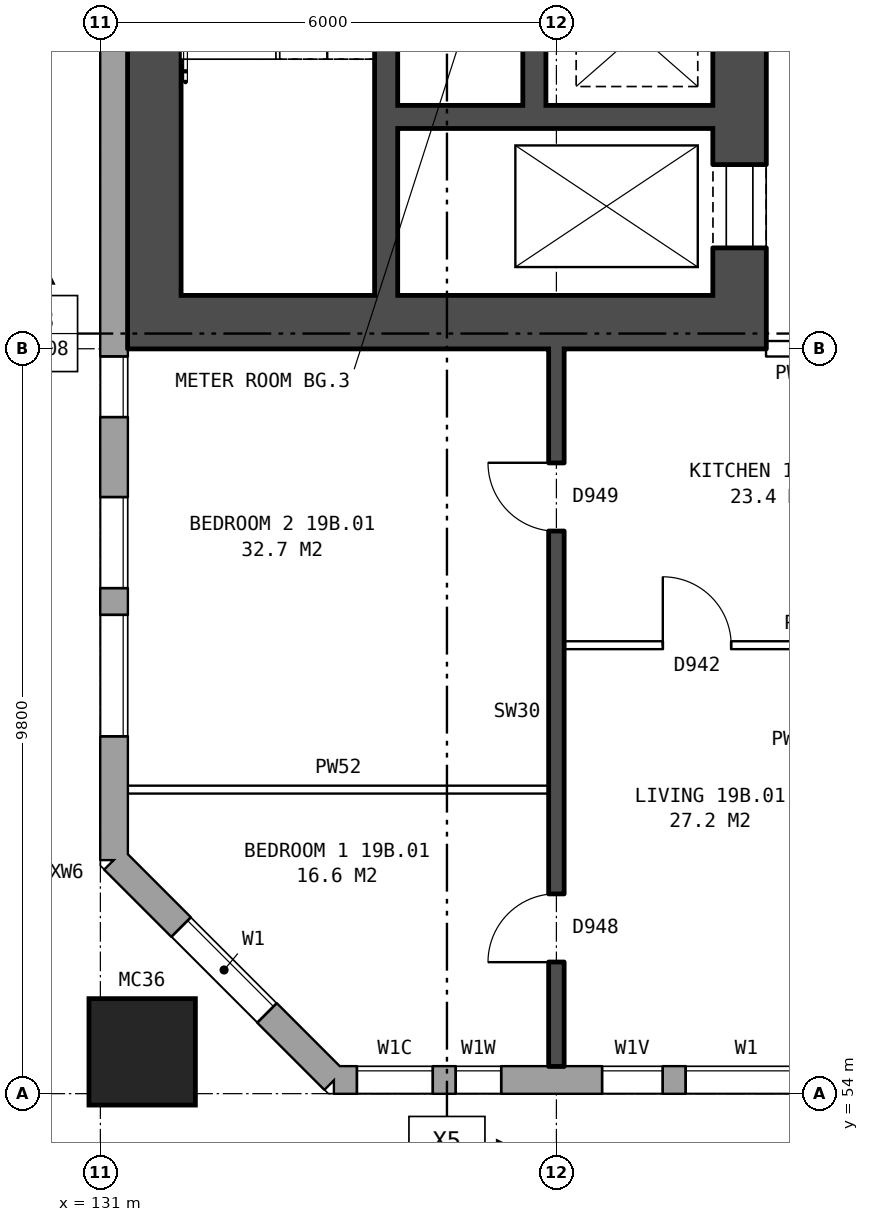
"""IFC4 building model, lengths in metres.
Left out: names, types, materials, properties, quantities, classifications, styles, units other than length and angle.
Written with IfcOpenShell. Run it as: python <this file> out.ifc"""

import sys

from ifc_helpers import new_model, si_unit, direction, frame, frame_2d, origin, origin_2d, place, context, subcontext, project, spatial, rectangle, hollow_rectangle, extrude, element, fill, save


model = new_model("IFC4")
c1 = context("Model", 3, precision=1e-05, world=origin(), true_north=direction((0.0, 1.0)))
c2 = subcontext(c1, "Body", "Model", "MODEL_VIEW")
j1 = project(units=[si_unit("LENGTHUNIT", "METRE"), si_unit("PLANEANGLEUNIT", "RADIAN")], contexts=[c1])
p1 = place(None, origin())
s1 = spatial("IfcSite", under=j1, at=p1, CompositionType="ELEMENT")
p2 = place(p1, origin())
s2 = spatial("IfcBuilding", under=s1, at=p2, CompositionType="ELEMENT")
p3 = place(p2, frame((0.0, 0.0, 71.6)))
s3 = spatial("IfcBuildingStorey", under=s2, at=p3, CompositionType="ELEMENT", Elevation=71.6)
p4 = place(p3, frame((131.55, 54.55, 0.0), z_axis=(0.0, 0.0, 1.0), x_axis=(1.0, 0.0, 0.0)))
e1 = element("IfcColumn", 1, at=p4, inside=s3, PredefinedType="COLUMN", context=c2, shape_type="SweptSolid", body=[
    extrude(hollow_rectangle(XDim=1.4, YDim=1.4, WallThickness=0.075, at=origin_2d()), origin(), (0.0, 0.0, 1.0), 3.1),
])
p5 = place(p3, frame((131.18, 57.075, 0.0), z_axis=(0.0, 0.0, 1.0), x_axis=(0.707106781187, -0.707106781187, 0.0)))
e2 = element("IfcWall", 2, at=p5, inside=s3, PredefinedType="STANDARD", context=c2, shape_type="SweptSolid", body=[
    extrude(rectangle(XDim=4.094, YDim=0.36, at=frame_2d((2.047, 0.0))), origin(), (0.0, 0.0, 1.0), 2.85),
])
p6 = place(p5, frame((1.247, 0.0, 0.8)))
e3 = element("IfcOpeningElement", 3, at=p6, cuts=e2, PredefinedType="OPENING", context=c2, shape_type="SweptSolid", body=[
    extrude(rectangle(XDim=1.6, YDim=1.8, at=frame_2d((0.8, 0.9))), frame((0.0, 0.19, 0.0), z_axis=(0.0, -1.0, 0.0), x_axis=(1.0, 0.0, 0.0)), (0.0, 0.0, 1.0), 0.38),
])
p7 = place(p3, frame((134.075, 54.18, 0.0), z_axis=(0.0, 0.0, 1.0), x_axis=(1.0, 0.0, 0.0)))
e4 = element("IfcWall", 4, at=p7, inside=s3, PredefinedType="STANDARD", context=c2, shape_type="SweptSolid", body=[
    extrude(rectangle(XDim=38.101, YDim=0.36, at=frame_2d((19.05, 0.0))), origin(), (0.0, 0.0, 1.0), 2.85),
])
p8 = place(p7, frame((0.3, 0.0, 0.8)))
e5 = element("IfcOpeningElement", 5, at=p8, cuts=e4, PredefinedType="OPENING", context=c2, shape_type="SweptSolid", body=[
    extrude(rectangle(XDim=1.0, YDim=1.8, at=frame_2d((0.5, 0.9))), frame((0.0, 0.19, 0.0), z_axis=(0.0, -1.0, 0.0), x_axis=(1.0, 0.0, 0.0)), (0.0, 0.0, 1.0), 0.38),
])
p9 = place(p7, frame((3.525, 0.0, 0.8)))
e6 = element("IfcOpeningElement", 6, at=p9, cuts=e4, PredefinedType="OPENING", context=c2, shape_type="SweptSolid", body=[
    extrude(rectangle(XDim=0.8, YDim=0.9, at=frame_2d((0.4, 0.45))), frame((0.0, 0.19, 0.0), z_axis=(0.0, -1.0, 0.0), x_axis=(1.0, 0.0, 0.0)), (0.0, 0.0, 1.0), 0.38),
])
p10 = place(p7, frame((6.625, 0.0, 0.8)))
e7 = element("IfcOpeningElement", 7, at=p10, cuts=e4, PredefinedType="OPENING", context=c2, shape_type="SweptSolid", body=[
    extrude(rectangle(XDim=1.6, YDim=1.8, at=frame_2d((0.8, 0.9))), frame((0.0, 0.19, 0.0), z_axis=(0.0, -1.0, 0.0), x_axis=(1.0, 0.0, 0.0)), (0.0, 0.0, 1.0), 0.38),
])
p11 = place(p7, frame((9.625, 0.0, 0.8)))
e8 = element("IfcOpeningElement", 8, at=p11, cuts=e4, PredefinedType="OPENING", context=c2, shape_type="SweptSolid", body=[
    extrude(rectangle(XDim=1.6, YDim=1.8, at=frame_2d((0.8, 0.9))), frame((0.0, 0.19, 0.0), z_axis=(0.0, -1.0, 0.0), x_axis=(1.0, 0.0, 0.0)), (0.0, 0.0, 1.0), 0.38),
])
p12 = place(p7, frame((12.625, 0.0, 0.8)))
e9 = element("IfcOpeningElement", 9, at=p12, cuts=e4, PredefinedType="OPENING", context=c2, shape_type="SweptSolid", body=[
    extrude(rectangle(XDim=1.6, YDim=1.8, at=frame_2d((0.8, 0.9))), frame((0.0, 0.19, 0.0), z_axis=(0.0, -1.0, 0.0), x_axis=(1.0, 0.0, 0.0)), (0.0, 0.0, 1.0), 0.38),
])
p13 = place(p7, frame((15.625, 0.0, 0.8)))
e10 = element("IfcOpeningElement", 10, at=p13, cuts=e4, PredefinedType="OPENING", context=c2, shape_type="SweptSolid", body=[
    extrude(rectangle(XDim=1.6, YDim=1.8, at=frame_2d((0.8, 0.9))), frame((0.0, 0.19, 0.0), z_axis=(0.0, -1.0, 0.0), x_axis=(1.0, 0.0, 0.0)), (0.0, 0.0, 1.0), 0.38),
])
p14 = place(p7, frame((18.625, 0.0, 0.8)))
e11 = element("IfcOpeningElement", 11, at=p14, cuts=e4, PredefinedType="OPENING", context=c2, shape_type="SweptSolid", body=[
    extrude(rectangle(XDim=1.6, YDim=1.8, at=frame_2d((0.8, 0.9))), frame((0.0, 0.19, 0.0), z_axis=(0.0, -1.0, 0.0), x_axis=(1.0, 0.0, 0.0)), (0.0, 0.0, 1.0), 0.38),
])
p15 = place(p7, frame((21.625, 0.0, 0.8)))
e12 = element("IfcOpeningElement", 12, at=p15, cuts=e4, PredefinedType="OPENING", context=c2, shape_type="SweptSolid", body=[
    extrude(rectangle(XDim=1.6, YDim=1.8, at=frame_2d((0.8, 0.9))), frame((0.0, 0.19, 0.0), z_axis=(0.0, -1.0, 0.0), x_axis=(1.0, 0.0, 0.0)), (0.0, 0.0, 1.0), 0.38),
])
p16 = place(p7, frame((24.625, 0.0, 0.8)))
e13 = element("IfcOpeningElement", 13, at=p16, cuts=e4, PredefinedType="OPENING", context=c2, shape_type="SweptSolid", body=[
    extrude(rectangle(XDim=1.6, YDim=1.8, at=frame_2d((0.8, 0.9))), frame((0.0, 0.19, 0.0), z_axis=(0.0, -1.0, 0.0), x_axis=(1.0, 0.0, 0.0)), (0.0, 0.0, 1.0), 0.38),
])
p17 = place(p7, frame((27.625, 0.0, 0.8)))
e14 = element("IfcOpeningElement", 14, at=p17, cuts=e4, PredefinedType="OPENING", context=c2, shape_type="SweptSolid", body=[
    extrude(rectangle(XDim=1.6, YDim=1.8, at=frame_2d((0.8, 0.9))), frame((0.0, 0.19, 0.0), z_axis=(0.0, -1.0, 0.0), x_axis=(1.0, 0.0, 0.0)), (0.0, 0.0, 1.0), 0.38),
])
p18 = place(p7, frame((30.625, 0.0, 0.8)))
e15 = element("IfcOpeningElement", 15, at=p18, cuts=e4, PredefinedType="OPENING", context=c2, shape_type="SweptSolid", body=[
    extrude(rectangle(XDim=1.6, YDim=1.8, at=frame_2d((0.8, 0.9))), frame((0.0, 0.19, 0.0), z_axis=(0.0, -1.0, 0.0), x_axis=(1.0, 0.0, 0.0)), (0.0, 0.0, 1.0), 0.38),
])
p19 = place(p7, frame((33.125, 0.0, 0.8)))
e16 = element("IfcOpeningElement", 16, at=p19, cuts=e4, PredefinedType="OPENING", context=c2, shape_type="SweptSolid", body=[
    extrude(rectangle(XDim=1.4, YDim=0.9, at=frame_2d((0.7, 0.45))), frame((0.0, 0.19, 0.0), z_axis=(0.0, -1.0, 0.0), x_axis=(1.0, 0.0, 0.0)), (0.0, 0.0, 1.0), 0.38),
])
p20 = place(p7, frame((1.6, 0.0, 1.6)))
e17 = element("IfcOpeningElement", 17, at=p20, cuts=e4, PredefinedType="OPENING", context=c2, shape_type="SweptSolid", body=[
    extrude(rectangle(XDim=0.6, YDim=0.9, at=frame_2d((0.3, 0.45))), frame((0.0, 0.19, 0.0), z_axis=(0.0, -1.0, 0.0), x_axis=(1.0, 0.0, 0.0)), (0.0, 0.0, 1.0), 0.38),
])
p21 = place(p7, frame((4.625, 0.0, 0.8)))
e18 = element("IfcOpeningElement", 18, at=p21, cuts=e4, PredefinedType="OPENING", context=c2, shape_type="SweptSolid", body=[
    extrude(rectangle(XDim=1.6, YDim=1.8, at=frame_2d((0.8, 0.9))), frame((0.0, 0.19, 0.0), z_axis=(0.0, -1.0, 0.0), x_axis=(1.0, 0.0, 0.0)), (0.0, 0.0, 1.0), 0.38),
])
p22 = place(p7, frame((35.775, 0.0, 1.7)))
e19 = element("IfcOpeningElement", 19, at=p22, cuts=e4, PredefinedType="OPENING", context=c2, shape_type="SweptSolid", body=[
    extrude(rectangle(XDim=0.6, YDim=0.9, at=frame_2d((0.3, 0.45))), frame((0.0, 0.19, 0.0), z_axis=(0.0, -1.0, 0.0), x_axis=(1.0, 0.0, 0.0)), (0.0, 0.0, 1.0), 0.38),
])
p23 = place(p7, frame((36.675, 0.0, 0.8)))
e20 = element("IfcOpeningElement", 20, at=p23, cuts=e4, PredefinedType="OPENING", context=c2, shape_type="SweptSolid", body=[
    extrude(rectangle(XDim=1.0, YDim=1.8, at=frame_2d((0.5, 0.9))), frame((0.0, 0.19, 0.0), z_axis=(0.0, -1.0, 0.0), x_axis=(1.0, 0.0, 0.0)), (0.0, 0.0, 1.0), 0.38),
])
p24 = place(p3, frame((131.18, 82.925, 0.0), z_axis=(0.0, 0.0, 1.0), x_axis=(0.0, -1.0, 0.0)))
e21 = element("IfcWall", 21, at=p24, inside=s3, PredefinedType="STANDARD", context=c2, shape_type="SweptSolid", body=[
    extrude(rectangle(XDim=25.851, YDim=0.36, at=frame_2d((12.925, 0.0))), origin(), (0.0, 0.0, 1.0), 2.85),
])
p25 = place(p24, frame((1.625, 0.0, 0.8)))
e22 = element("IfcOpeningElement", 22, at=p25, cuts=e21, PredefinedType="OPENING", context=c2, shape_type="SweptSolid", body=[
    extrude(rectangle(XDim=1.6, YDim=1.8, at=frame_2d((0.8, 0.9))), frame((0.0, 0.19, 0.0), z_axis=(0.0, -1.0, 0.0), x_axis=(1.0, 0.0, 0.0)), (0.0, 0.0, 1.0), 0.38),
])
p26 = place(p24, frame((3.525, 0.0, 1.7)))
e23 = element("IfcOpeningElement", 23, at=p26, cuts=e21, PredefinedType="OPENING", context=c2, shape_type="SweptSolid", body=[
    extrude(rectangle(XDim=1.2, YDim=0.9, at=frame_2d((0.6, 0.45))), frame((0.0, 0.19, 0.0), z_axis=(0.0, -1.0, 0.0), x_axis=(1.0, 0.0, 0.0)), (0.0, 0.0, 1.0), 0.38),
])
p27 = place(p24, frame((19.225, 0.0, 0.8)))
e24 = element("IfcOpeningElement", 24, at=p27, cuts=e21, PredefinedType="OPENING", context=c2, shape_type="SweptSolid", body=[
    extrude(rectangle(XDim=0.8, YDim=0.9, at=frame_2d((0.4, 0.45))), frame((0.0, 0.19, 0.0), z_axis=(0.0, -1.0, 0.0), x_axis=(1.0, 0.0, 0.0)), (0.0, 0.0, 1.0), 0.38),
])
p28 = place(p24, frame((22.625, 0.0, 0.8)))
e25 = element("IfcOpeningElement", 25, at=p28, cuts=e21, PredefinedType="OPENING", context=c2, shape_type="SweptSolid", body=[
    extrude(rectangle(XDim=1.6, YDim=1.8, at=frame_2d((0.8, 0.9))), frame((0.0, 0.19, 0.0), z_axis=(0.0, -1.0, 0.0), x_axis=(1.0, 0.0, 0.0)), (0.0, 0.0, 1.0), 0.38),
])
p29 = place(p24, frame((5.775, 0.0, 0.8)))
e26 = element("IfcOpeningElement", 26, at=p29, cuts=e21, PredefinedType="OPENING", context=c2, shape_type="SweptSolid", body=[
    extrude(rectangle(XDim=0.8, YDim=0.9, at=frame_2d((0.4, 0.45))), frame((0.0, 0.19, 0.0), z_axis=(0.0, -1.0, 0.0), x_axis=(1.0, 0.0, 0.0)), (0.0, 0.0, 1.0), 0.38),
])
p30 = place(p24, frame((21.075, 0.0, 1.7)))
e27 = element("IfcOpeningElement", 27, at=p30, cuts=e21, PredefinedType="OPENING", context=c2, shape_type="SweptSolid", body=[
    extrude(rectangle(XDim=1.2, YDim=0.9, at=frame_2d((0.6, 0.45))), frame((0.0, 0.19, 0.0), z_axis=(0.0, -1.0, 0.0), x_axis=(1.0, 0.0, 0.0)), (0.0, 0.0, 1.0), 0.38),
])
p31 = place(p3, frame((139.41, 64.5, 0.0), z_axis=(0.0, 0.0, 1.0), x_axis=(0.0, 1.0, 0.0)))
e28 = element("IfcWall", 28, at=p31, inside=s3, PredefinedType="SHEAR", context=c2, shape_type="SweptSolid", body=[
    extrude(rectangle(XDim=11.0, YDim=0.7, at=frame_2d((5.5, 0.0))), origin(), (0.0, 0.0, 1.0), 2.85),
])
p32 = place(p31, frame((0.625, 0.0, 0.0)))
e29 = element("IfcOpeningElement", 29, at=p32, cuts=e28, PredefinedType="OPENING", context=c2, shape_type="SweptSolid", body=[
    extrude(rectangle(XDim=1.1, YDim=2.1, at=frame_2d((0.55, 1.05))), frame((0.0, 0.36, 0.0), z_axis=(0.0, -1.0, 0.0), x_axis=(1.0, 0.0, 0.0)), (0.0, 0.0, 1.0), 0.72),
])
p33 = place(p31, frame((9.2, 0.0, 0.0)))
e30 = element("IfcOpeningElement", 30, at=p33, cuts=e28, PredefinedType="OPENING", context=c2, shape_type="SweptSolid", body=[
    extrude(rectangle(XDim=1.1, YDim=2.1, at=frame_2d((0.55, 1.05))), frame((0.0, 0.36, 0.0), z_axis=(0.0, -1.0, 0.0), x_axis=(1.0, 0.0, 0.0)), (0.0, 0.0, 1.0), 0.72),
])
p34 = place(p31, frame((7.425, 0.0, 0.0)))
e31 = element("IfcOpeningElement", 31, at=p34, cuts=e28, PredefinedType="OPENING", context=c2, shape_type="SweptSolid", body=[
    extrude(rectangle(XDim=0.85, YDim=2.1, at=frame_2d((0.425, 1.05))), frame((0.0, 0.36, 0.0), z_axis=(0.0, -1.0, 0.0), x_axis=(1.0, 0.0, 0.0)), (0.0, 0.0, 1.0), 0.72),
])
p35 = place(p3, frame((131.71, 64.5, 0.0), z_axis=(0.0, 0.0, 1.0), x_axis=(0.0, 1.0, 0.0)))
e32 = element("IfcWall", 32, at=p35, inside=s3, PredefinedType="SHEAR", context=c2, shape_type="SweptSolid", body=[
    extrude(rectangle(XDim=11.0, YDim=0.7, at=frame_2d((5.5, 0.0))), origin(), (0.0, 0.0, 1.0), 2.85),
])
p36 = place(p3, frame((139.76, 64.15, 0.0), z_axis=(0.0, 0.0, 1.0), x_axis=(-1.0, 0.0, 0.0)))
e33 = element("IfcWall", 33, at=p36, inside=s3, PredefinedType="SHEAR", context=c2, shape_type="SweptSolid", body=[
    extrude(rectangle(XDim=8.4, YDim=0.7, at=frame_2d((4.2, 0.0))), origin(), (0.0, 0.0, 1.0), 2.85),
])
p37 = place(p3, frame((139.06, 66.85, 0.0), z_axis=(0.0, 0.0, 1.0), x_axis=(-1.0, 0.0, 0.0)))
e34 = element("IfcWall", 34, at=p37, inside=s3, PredefinedType="SHEAR", context=c2, shape_type="SweptSolid", body=[
    extrude(rectangle(XDim=4.15, YDim=0.3, at=frame_2d((2.075, 0.0))), origin(), (0.0, 0.0, 1.0), 2.85),
])
p38 = place(p3, frame((136.71, 67.0, 0.0), z_axis=(0.0, 0.0, 1.0), x_axis=(0.0, 1.0, 0.0)))
e35 = element("IfcWall", 35, at=p38, inside=s3, PredefinedType="SHEAR", context=c2, shape_type="SweptSolid", body=[
    extrude(rectangle(XDim=4.1, YDim=0.3, at=frame_2d((2.05, 0.0))), origin(), (0.0, 0.0, 1.0), 2.85),
])
p39 = place(p3, frame((134.76, 64.5, 0.0), z_axis=(0.0, 0.0, 1.0), x_axis=(0.0, 1.0, 0.0)))
e36 = element("IfcWall", 36, at=p39, inside=s3, PredefinedType="SHEAR", context=c2, shape_type="SweptSolid", body=[
    extrude(rectangle(XDim=6.6, YDim=0.3, at=frame_2d((3.3, 0.0))), origin(), (0.0, 0.0, 1.0), 2.85),
])
p40 = place(p3, frame((131.36, 58.0, 0.0), z_axis=(0.0, 0.0, 1.0), x_axis=(1.0, 0.0, 0.0)))
e37 = element("IfcWall", 37, at=p40, inside=s3, PredefinedType="PARTITIONING", context=c2, shape_type="SweptSolid", body=[
    extrude(rectangle(XDim=5.54, YDim=0.1, at=frame_2d((2.77, 0.0))), origin(), (0.0, 0.0, 1.0), 2.85),
])
p41 = place(p3, frame((137.1, 59.9, 0.0), z_axis=(0.0, 0.0, 1.0), x_axis=(1.0, 0.0, 0.0)))
e38 = element("IfcWall", 38, at=p41, inside=s3, PredefinedType="PARTITIONING", context=c2, shape_type="SweptSolid", body=[
    extrude(rectangle(XDim=5.8, YDim=0.1, at=frame_2d((2.9, 0.0))), origin(), (0.0, 0.0, 1.0), 2.85),
])
p42 = place(p41, frame((1.3, 0.0, 0.0)))
e39 = element("IfcOpeningElement", 39, at=p42, cuts=e38, PredefinedType="OPENING", context=c2, shape_type="SweptSolid", body=[
    extrude(rectangle(XDim=0.9, YDim=2.1, at=frame_2d((0.45, 1.05))), frame((0.0, 0.06, 0.0), z_axis=(0.0, -1.0, 0.0), x_axis=(1.0, 0.0, 0.0)), (0.0, 0.0, 1.0), 0.12),
])
p43 = place(p41, frame((4.2, 0.0, 0.0)))
e40 = element("IfcOpeningElement", 40, at=p43, cuts=e38, PredefinedType="OPENING", context=c2, shape_type="SweptSolid", body=[
    extrude(rectangle(XDim=0.9, YDim=2.1, at=frame_2d((0.45, 1.05))), frame((0.0, 0.06, 0.0), z_axis=(0.0, -1.0, 0.0), x_axis=(1.0, 0.0, 0.0)), (0.0, 0.0, 1.0), 0.12),
])
p44 = place(p3, frame((139.76, 63.8, 0.0), z_axis=(0.0, 0.0, 1.0), x_axis=(1.0, 0.0, 0.0)))
e41 = element("IfcWall", 41, at=p44, inside=s3, PredefinedType="PARTITIONING", context=c2, shape_type="SweptSolid", body=[
    extrude(rectangle(XDim=3.0, YDim=0.2, at=frame_2d((1.5, 0.0))), origin(), (0.0, 0.0, 1.0), 2.85),
])
p45 = place(p44, frame((1.0, 0.0, 0.0)))
e42 = element("IfcOpeningElement", 42, at=p45, cuts=e41, PredefinedType="OPENING", context=c2, shape_type="SweptSolid", body=[
    extrude(rectangle(XDim=1.0, YDim=2.1, at=frame_2d((0.5, 1.05))), frame((0.0, 0.11, 0.0), z_axis=(0.0, -1.0, 0.0), x_axis=(1.0, 0.0, 0.0)), (0.0, 0.0, 1.0), 0.22),
])
p46 = place(p3, frame((137.0, 54.36, 0.0), z_axis=(0.0, 0.0, 1.0), x_axis=(0.0, 1.0, 0.0)))
e43 = element("IfcWall", 43, at=p46, inside=s3, PredefinedType="SOLIDWALL", context=c2, shape_type="SweptSolid", body=[
    extrude(rectangle(XDim=9.44, YDim=0.2, at=frame_2d((4.72, 0.0))), origin(), (0.0, 0.0, 1.0), 2.85),
])
p47 = place(p46, frame((1.37, 0.0, 0.0)))
e44 = element("IfcOpeningElement", 44, at=p47, cuts=e43, PredefinedType="OPENING", context=c2, shape_type="SweptSolid", body=[
    extrude(rectangle(XDim=0.9, YDim=2.1, at=frame_2d((0.45, 1.05))), frame((0.0, 0.11, 0.0), z_axis=(0.0, -1.0, 0.0), x_axis=(1.0, 0.0, 0.0)), (0.0, 0.0, 1.0), 0.22),
])
p48 = place(p46, frame((7.04, 0.0, 0.0)))
e45 = element("IfcOpeningElement", 45, at=p48, cuts=e43, PredefinedType="OPENING", context=c2, shape_type="SweptSolid", body=[
    extrude(rectangle(XDim=0.9, YDim=2.1, at=frame_2d((0.45, 1.05))), frame((0.0, 0.11, 0.0), z_axis=(0.0, -1.0, 0.0), x_axis=(1.0, 0.0, 0.0)), (0.0, 0.0, 1.0), 0.22),
])
p49 = place(p6, origin())
e46 = element("IfcWindow", 46, at=p49, inside=s3, PartitioningType="SINGLE_PANEL", PredefinedType="WINDOW", context=c2, shape_type="SweptSolid", body=[
    extrude(rectangle(XDim=1.6, YDim=1.8, at=frame_2d((0.8, 0.9))), frame((0.0, 0.15, 0.0), z_axis=(0.0, -1.0, 0.0), x_axis=(1.0, 0.0, 0.0)), (0.0, 0.0, 1.0), 0.06),
])
fill(e3, e46)
p50 = place(p8, origin())
e47 = element("IfcWindow", 47, at=p50, inside=s3, PartitioningType="SINGLE_PANEL", PredefinedType="WINDOW", context=c2, shape_type="SweptSolid", body=[
    extrude(rectangle(XDim=1.0, YDim=1.8, at=frame_2d((0.5, 0.9))), frame((0.0, 0.15, 0.0), z_axis=(0.0, -1.0, 0.0), x_axis=(1.0, 0.0, 0.0)), (0.0, 0.0, 1.0), 0.06),
])
fill(e5, e47)
p51 = place(p9, origin())
e48 = element("IfcWindow", 48, at=p51, inside=s3, PartitioningType="SINGLE_PANEL", PredefinedType="WINDOW", context=c2, shape_type="SweptSolid", body=[
    extrude(rectangle(XDim=0.8, YDim=0.9, at=frame_2d((0.4, 0.45))), frame((0.0, 0.15, 0.0), z_axis=(0.0, -1.0, 0.0), x_axis=(1.0, 0.0, 0.0)), (0.0, 0.0, 1.0), 0.06),
])
fill(e6, e48)
p52 = place(p27, origin())
e49 = element("IfcWindow", 49, at=p52, inside=s3, PartitioningType="SINGLE_PANEL", PredefinedType="WINDOW", context=c2, shape_type="SweptSolid", body=[
    extrude(rectangle(XDim=0.8, YDim=0.9, at=frame_2d((0.4, 0.45))), frame((0.0, 0.15, 0.0), z_axis=(0.0, -1.0, 0.0), x_axis=(1.0, 0.0, 0.0)), (0.0, 0.0, 1.0), 0.06),
])
fill(e24, e49)
p53 = place(p28, origin())
e50 = element("IfcWindow", 50, at=p53, inside=s3, PartitioningType="SINGLE_PANEL", PredefinedType="WINDOW", context=c2, shape_type="SweptSolid", body=[
    extrude(rectangle(XDim=1.6, YDim=1.8, at=frame_2d((0.8, 0.9))), frame((0.0, 0.15, 0.0), z_axis=(0.0, -1.0, 0.0), x_axis=(1.0, 0.0, 0.0)), (0.0, 0.0, 1.0), 0.06),
])
fill(e25, e50)
p54 = place(p32, origin())
e51 = element("IfcDoor", 51, at=p54, inside=s3, OperationType="DOUBLE_DOOR_SLIDING", PredefinedType="DOOR", context=c2, shape_type="SweptSolid", body=[
    extrude(rectangle(XDim=1.1, YDim=2.1, at=frame_2d((0.55, 1.05))), frame((0.0, 0.335, 0.0), z_axis=(0.0, -1.0, 0.0), x_axis=(1.0, 0.0, 0.0)), (0.0, 0.0, 1.0), 0.05),
])
fill(e29, e51)
p55 = place(p47, origin())
e52 = element("IfcDoor", 52, at=p55, inside=s3, OperationType="SINGLE_SWING_LEFT", PredefinedType="DOOR", context=c2, shape_type="SweptSolid", body=[
    extrude(rectangle(XDim=0.9, YDim=2.1, at=frame_2d((0.45, 1.05))), frame((0.0, 0.025, 0.0), z_axis=(0.0, -1.0, 0.0), x_axis=(1.0, 0.0, 0.0)), (0.0, 0.0, 1.0), 0.05),
])
fill(e44, e52)
p56 = place(p48, origin())
e53 = element("IfcDoor", 53, at=p56, inside=s3, OperationType="SINGLE_SWING_RIGHT", PredefinedType="DOOR", context=c2, shape_type="SweptSolid", body=[
    extrude(rectangle(XDim=0.9, YDim=2.1, at=frame_2d((0.45, 1.05))), frame((0.0, 0.025, 0.0), z_axis=(0.0, -1.0, 0.0), x_axis=(1.0, 0.0, 0.0)), (0.0, 0.0, 1.0), 0.05),
])
fill(e45, e53)
p57 = place(p42, origin())
e54 = element("IfcDoor", 54, at=p57, inside=s3, OperationType="SINGLE_SWING_LEFT", PredefinedType="DOOR", context=c2, shape_type="SweptSolid", body=[
    extrude(rectangle(XDim=0.9, YDim=2.1, at=frame_2d((0.45, 1.05))), frame((0.0, 0.025, 0.0), z_axis=(0.0, -1.0, 0.0), x_axis=(1.0, 0.0, 0.0)), (0.0, 0.0, 1.0), 0.05),
])
fill(e39, e54)
p58 = place(p20, origin())
e55 = element("IfcWindow", 55, at=p58, inside=s3, PartitioningType="SINGLE_PANEL", PredefinedType="WINDOW", context=c2, shape_type="SweptSolid", body=[
    extrude(rectangle(XDim=0.6, YDim=0.9, at=frame_2d((0.3, 0.45))), frame((0.0, 0.15, 0.0), z_axis=(0.0, -1.0, 0.0), x_axis=(1.0, 0.0, 0.0)), (0.0, 0.0, 1.0), 0.06),
])
fill(e17, e55)
p59 = place(p21, origin())
e56 = element("IfcWindow", 56, at=p59, inside=s3, PartitioningType="SINGLE_PANEL", PredefinedType="WINDOW", context=c2, shape_type="SweptSolid", body=[
    extrude(rectangle(XDim=1.6, YDim=1.8, at=frame_2d((0.8, 0.9))), frame((0.0, 0.15, 0.0), z_axis=(0.0, -1.0, 0.0), x_axis=(1.0, 0.0, 0.0)), (0.0, 0.0, 1.0), 0.06),
])
fill(e18, e56)
p60 = place(p30, origin())
e57 = element("IfcWindow", 57, at=p60, inside=s3, PartitioningType="SINGLE_PANEL", PredefinedType="WINDOW", context=c2, shape_type="SweptSolid", body=[
    extrude(rectangle(XDim=1.2, YDim=0.9, at=frame_2d((0.6, 0.45))), frame((0.0, 0.15, 0.0), z_axis=(0.0, -1.0, 0.0), x_axis=(1.0, 0.0, 0.0)), (0.0, 0.0, 1.0), 0.06),
])
fill(e27, e57)
save(model, sys.argv[1])
